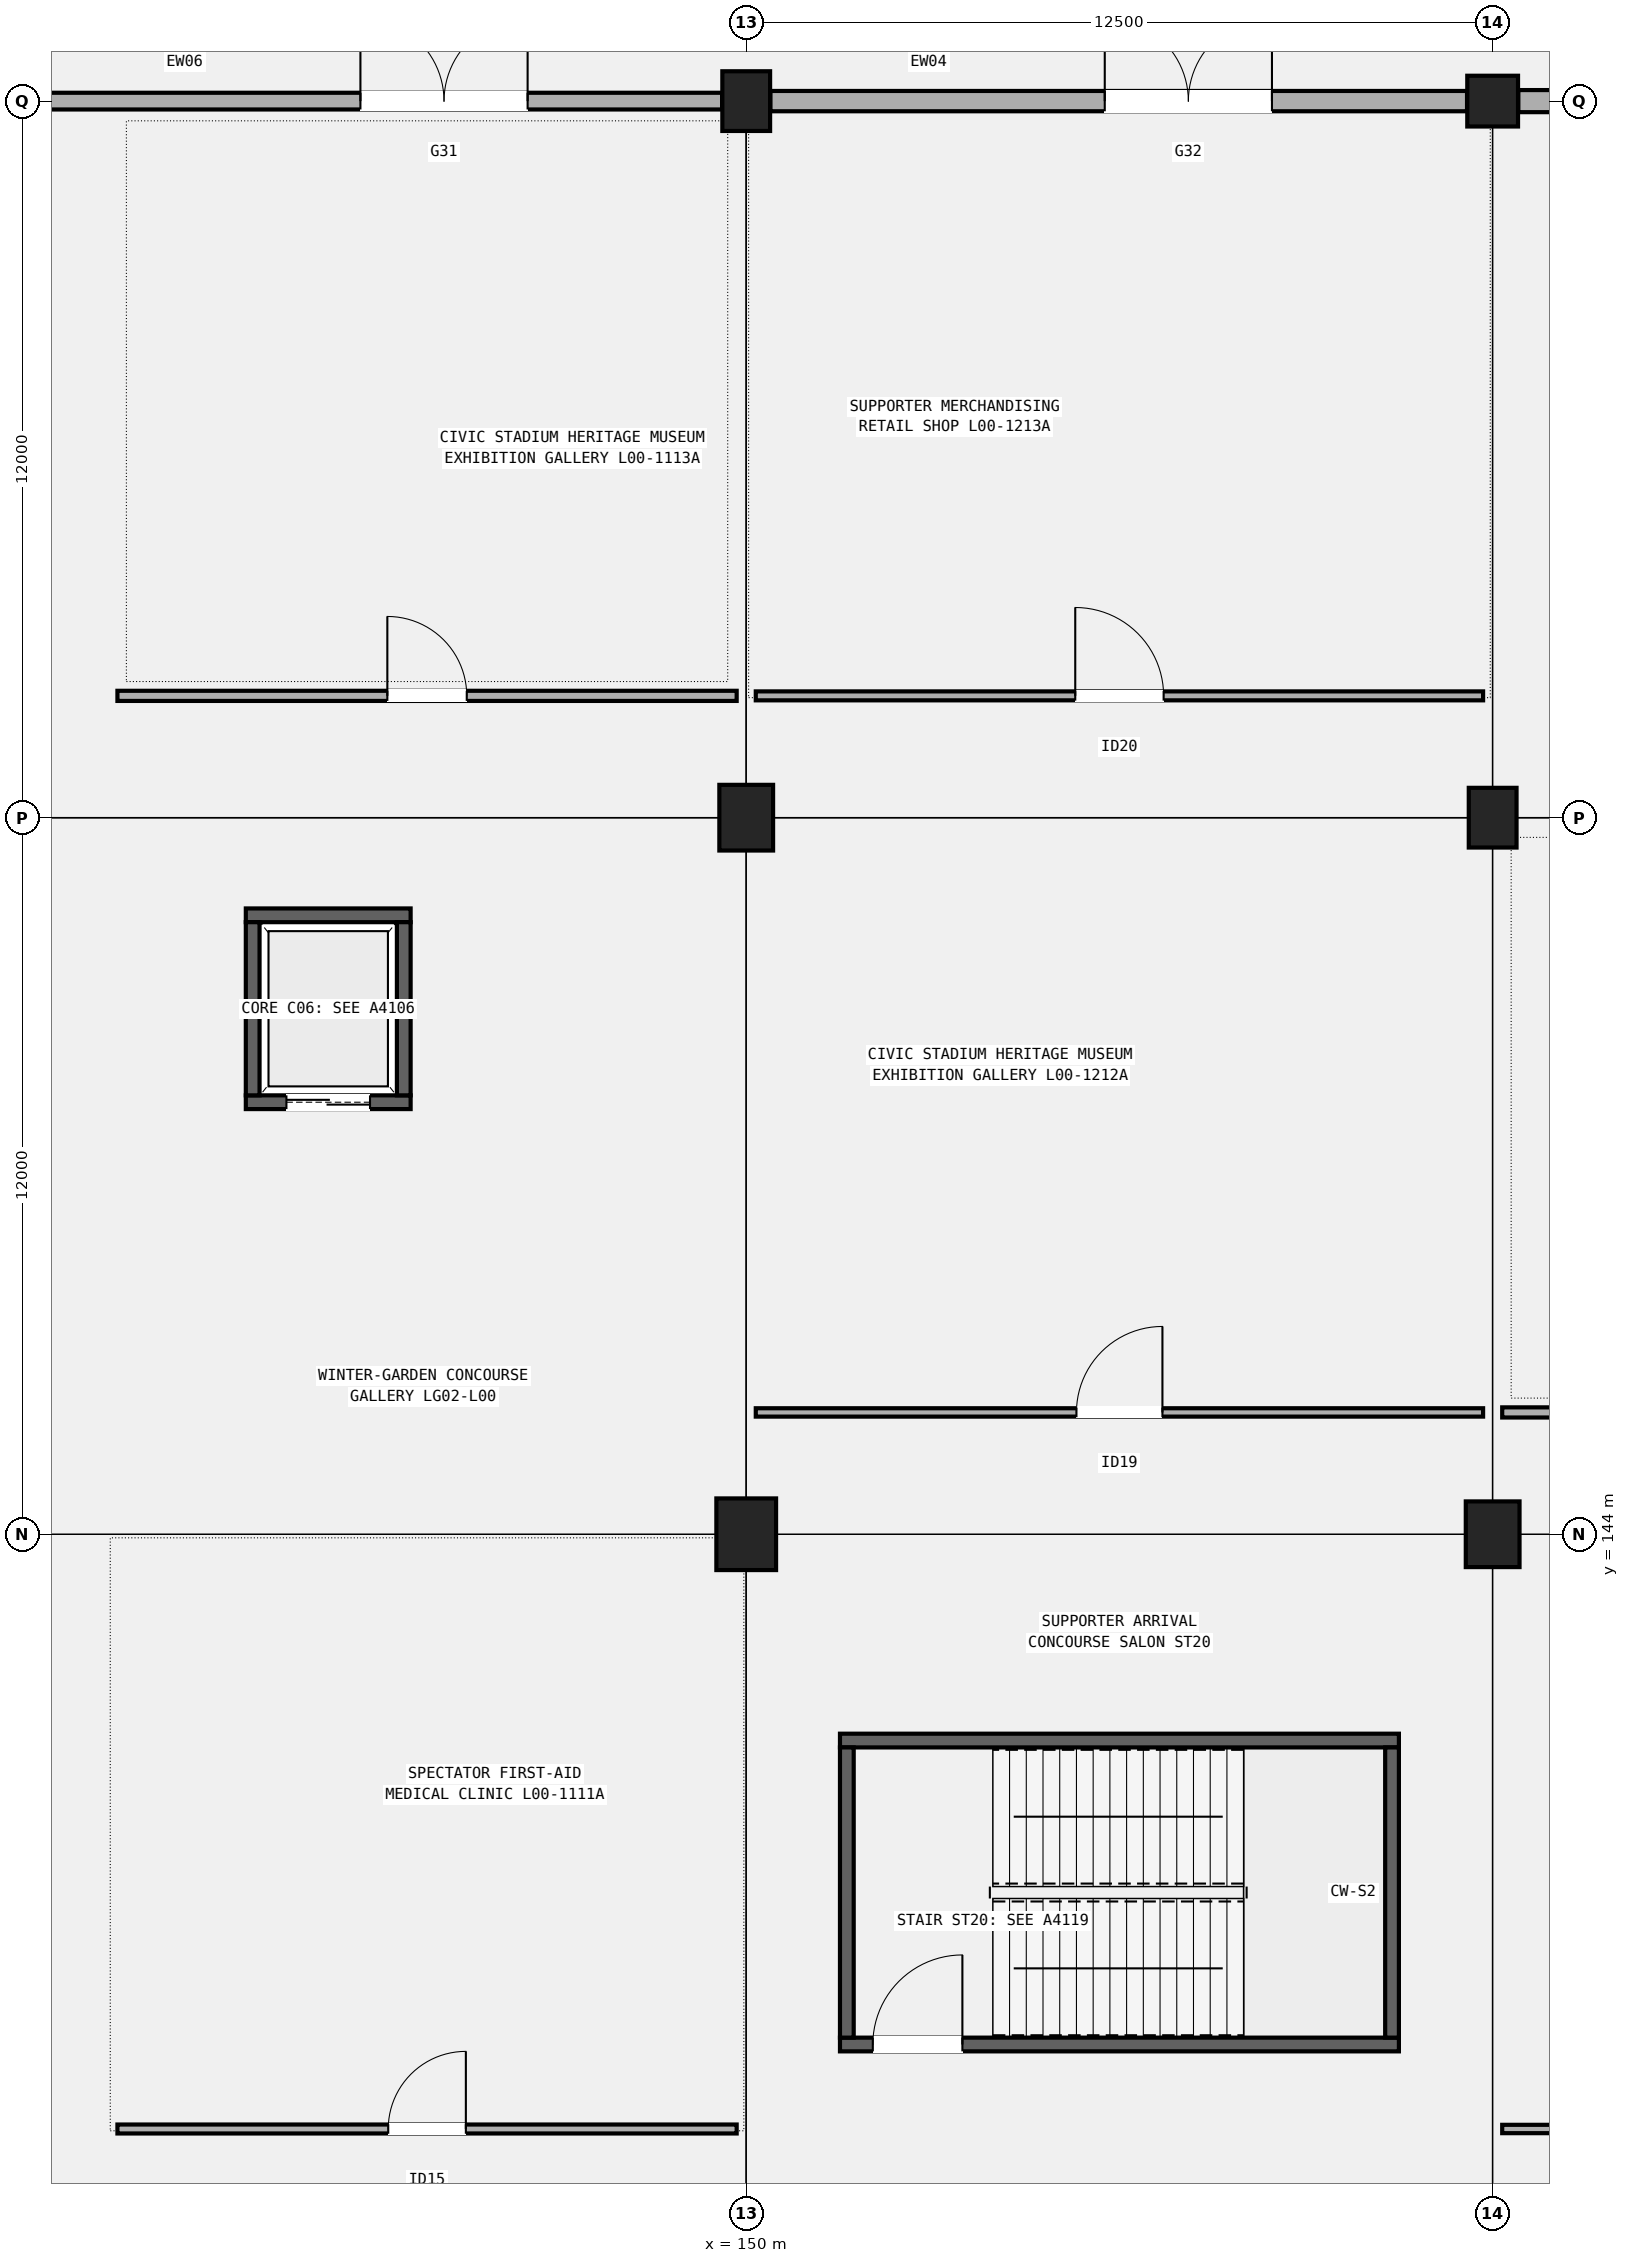
"""IFC4 building model, lengths in metres.
Left out: names, types, materials, properties, quantities, classifications, styles, units other than length and angle.
Written with IfcOpenShell. Run it as: python <this file> out.ifc"""

import sys

from ifc_helpers import new_model, si_unit, direction, frame, frame_2d, origin, origin_2d, place, context, subcontext, project, spatial, rectangle, circle, extrude, element, fill, save


model = new_model("IFC4")
c1 = context("Model", 3, precision=1e-05, world=origin(), true_north=direction((0.0, 1.0)))
c2 = subcontext(c1, "Body", "Model", "MODEL_VIEW")
j1 = project(units=[si_unit("LENGTHUNIT", "METRE"), si_unit("PLANEANGLEUNIT", "RADIAN")], contexts=[c1])
p1 = place(None, origin())
s1 = spatial("IfcSite", under=j1, at=p1, CompositionType="ELEMENT")
p2 = place(p1, origin())
s2 = spatial("IfcBuilding", under=s1, at=p2, CompositionType="ELEMENT")
p3 = place(p2, origin())
s3 = spatial("IfcBuildingStorey", under=s2, at=p3, CompositionType="ELEMENT", Elevation=0.0)
p4 = place(p3, frame((150.0, 144.0, 0.0), z_axis=(0.0, 0.0, 1.0), x_axis=(1.0, 0.0, 0.0)))
e1 = element("IfcColumn", 1, at=p4, inside=s3, PredefinedType="COLUMN", context=c2, shape_type="SweptSolid", body=[
    extrude(rectangle(XDim=1.0, YDim=1.2, at=origin_2d()), origin(), (0.0, 0.0, 1.0), 5.4),
])
p5 = place(p3, frame((150.0, 156.0, 0.0), z_axis=(0.0, 0.0, 1.0), x_axis=(1.0, 0.0, 0.0)))
e2 = element("IfcColumn", 2, at=p5, inside=s3, PredefinedType="COLUMN", context=c2, shape_type="SweptSolid", body=[
    extrude(rectangle(XDim=0.9, YDim=1.1, at=origin_2d()), origin(), (0.0, 0.0, 1.0), 5.4),
])
p6 = place(p3, frame((150.0, 168.0, 0.0), z_axis=(0.0, 0.0, 1.0), x_axis=(1.0, 0.0, 0.0)))
e3 = element("IfcColumn", 3, at=p6, inside=s3, PredefinedType="COLUMN", context=c2, shape_type="SweptSolid", body=[
    extrude(rectangle(XDim=0.8, YDim=1.0, at=origin_2d()), origin(), (0.0, 0.0, 1.0), 5.4),
])
p7 = place(p3, frame((162.5, 144.0, 0.0), z_axis=(0.0, 0.0, 1.0), x_axis=(1.0, 0.0, 0.0)))
e4 = element("IfcColumn", 4, at=p7, inside=s3, PredefinedType="COLUMN", context=c2, shape_type="SweptSolid", body=[
    extrude(rectangle(XDim=0.9, YDim=1.1, at=origin_2d()), origin(), (0.0, 0.0, 1.0), 5.4),
])
p8 = place(p3, frame((162.5, 156.0, 0.0), z_axis=(0.0, 0.0, 1.0), x_axis=(1.0, 0.0, 0.0)))
e5 = element("IfcColumn", 5, at=p8, inside=s3, PredefinedType="COLUMN", context=c2, shape_type="SweptSolid", body=[
    extrude(rectangle(XDim=0.8, YDim=1.0, at=origin_2d()), origin(), (0.0, 0.0, 1.0), 5.4),
])
p9 = place(p3, frame((162.5, 168.0, 0.0), z_axis=(0.0, 0.0, 1.0), x_axis=(1.0, 0.0, 0.0)))
e6 = element("IfcColumn", 6, at=p9, inside=s3, PredefinedType="COLUMN", context=c2, shape_type="SweptSolid", body=[
    extrude(circle(Radius=0.425, at=origin_2d()), origin(), (0.0, 0.0, 1.0), 5.4),
])
p10 = place(p3, frame((137.954, 168.0, 0.0), z_axis=(0.0, 0.0, 1.0), x_axis=(1.0, 0.0, 0.0)))
e7 = element("IfcWall", 7, at=p10, inside=s3, PredefinedType="SOLIDWALL", context=c2, shape_type="SweptSolid", body=[
    extrude(rectangle(XDim=11.642, YDim=0.28, at=frame_2d((5.821, 0.0))), origin(), (0.0, 0.0, 1.0), 4.24),
])
p11 = place(p10, frame((5.585, 0.0, 0.0)))
e8 = element("IfcOpeningElement", 8, at=p11, cuts=e7, PredefinedType="OPENING", context=c2, shape_type="SweptSolid", body=[
    extrude(rectangle(XDim=2.8, YDim=2.4, at=frame_2d((1.4, 1.2))), frame((0.0, 0.15, 0.0), z_axis=(0.0, -1.0, 0.0), x_axis=(1.0, 0.0, 0.0)), (0.0, 0.0, 1.0), 0.3),
])
p12 = place(p3, frame((150.404, 168.0, 0.0), z_axis=(0.0, 0.0, 1.0), x_axis=(1.0, 0.0, 0.0)))
e9 = element("IfcWall", 9, at=p12, inside=s3, PredefinedType="SOLIDWALL", context=c2, shape_type="SweptSolid", body=[
    extrude(rectangle(XDim=11.667, YDim=0.34, at=frame_2d((5.833, 0.0))), origin(), (0.0, 0.0, 1.0), 4.24),
])
p13 = place(p12, frame((5.6, 0.0, 0.0)))
e10 = element("IfcOpeningElement", 10, at=p13, cuts=e9, PredefinedType="OPENING", context=c2, shape_type="SweptSolid", body=[
    extrude(rectangle(XDim=2.8, YDim=2.4, at=frame_2d((1.4, 1.2))), frame((0.0, 0.18, 0.0), z_axis=(0.0, -1.0, 0.0), x_axis=(1.0, 0.0, 0.0)), (0.0, 0.0, 1.0), 0.36),
])
p14 = place(p3, frame((162.929, 168.0, 0.0), z_axis=(0.0, 0.0, 1.0), x_axis=(1.0, 0.0, 0.0)))
e11 = element("IfcWall", 11, at=p14, inside=s3, PredefinedType="SOLIDWALL", context=c2, shape_type="SweptSolid", body=[
    extrude(rectangle(XDim=11.567, YDim=0.37, at=frame_2d((5.784, 0.0))), origin(), (0.0, 0.0, 1.0), 4.34),
])
p15 = place(p14, frame((1.5, 0.0, 0.95)))
e12 = element("IfcOpeningElement", 12, at=p15, cuts=e11, PredefinedType="OPENING", context=c2, shape_type="SweptSolid", body=[
    extrude(rectangle(XDim=2.4, YDim=2.05, at=frame_2d((1.2, 1.025))), frame((0.0, 0.195, 0.0), z_axis=(0.0, -1.0, 0.0), x_axis=(1.0, 0.0, 0.0)), (0.0, 0.0, 1.0), 0.39),
])
p16 = place(p3, frame((151.57, 135.455, 0.0), z_axis=(0.0, 0.0, 1.0), x_axis=(1.0, 0.0, 0.0)))
e13 = element("IfcWall", 13, at=p16, inside=s3, PredefinedType="SHEAR", context=c2, shape_type="SweptSolid", body=[
    extrude(rectangle(XDim=9.36, YDim=0.23, at=frame_2d((4.68, 0.0))), origin(), (0.0, 0.0, 1.0), 5.14),
])
p17 = place(p16, frame((0.55, 0.0, 0.0)))
e14 = element("IfcOpeningElement", 14, at=p17, cuts=e13, PredefinedType="OPENING", context=c2, shape_type="SweptSolid", body=[
    extrude(rectangle(XDim=1.5, YDim=2.2, at=frame_2d((0.75, 1.1))), frame((0.0, 0.125, 0.0), z_axis=(0.0, -1.0, 0.0), x_axis=(1.0, 0.0, 0.0)), (0.0, 0.0, 1.0), 0.25),
])
p18 = place(p3, frame((151.57, 140.545, 0.0), z_axis=(0.0, 0.0, 1.0), x_axis=(1.0, 0.0, 0.0)))
e15 = element("IfcWall", 15, at=p18, inside=s3, PredefinedType="SHEAR", context=c2, shape_type="SweptSolid", body=[
    extrude(rectangle(XDim=9.36, YDim=0.23, at=frame_2d((4.68, 0.0))), origin(), (0.0, 0.0, 1.0), 5.14),
])
for number, where, z_axis, x_axis in (
    (16, (151.685, 135.57, 0.0), (0.0, 0.0, 1.0), (0.0, 1.0, 0.0)),
    (17, (160.815, 135.57, 0.0), (0.0, 0.0, 1.0), (0.0, 1.0, 0.0)),
):
    element("IfcWall", number, at=place(p3, frame(where, z_axis=z_axis, x_axis=x_axis)), inside=s3, PredefinedType="SHEAR", context=c2, shape_type="SweptSolid", body=[
        extrude(rectangle(XDim=4.86, YDim=0.23, at=frame_2d((2.43, 0.0))), origin(), (0.0, 0.0, 1.0), 5.14),
    ])
p19 = place(p3, frame((141.62, 151.235, 0.0), z_axis=(0.0, 0.0, 1.0), x_axis=(1.0, 0.0, 0.0)))
e18 = element("IfcWall", 18, at=p19, inside=s3, PredefinedType="SHEAR", context=c2, shape_type="SweptSolid", body=[
    extrude(rectangle(XDim=2.76, YDim=0.23, at=frame_2d((1.38, 0.0))), origin(), (0.0, 0.0, 1.0), 5.14),
])
p20 = place(p19, frame((0.68, 0.0, 0.0)))
e19 = element("IfcOpeningElement", 19, at=p20, cuts=e18, PredefinedType="OPENING", context=c2, shape_type="SweptSolid", body=[
    extrude(rectangle(XDim=1.4, YDim=2.25, at=frame_2d((0.7, 1.125))), frame((0.0, 0.125, 0.0), z_axis=(0.0, -1.0, 0.0), x_axis=(1.0, 0.0, 0.0)), (0.0, 0.0, 1.0), 0.25),
])
p21 = place(p3, frame((141.62, 154.365, 0.0), z_axis=(0.0, 0.0, 1.0), x_axis=(1.0, 0.0, 0.0)))
e20 = element("IfcWall", 20, at=p21, inside=s3, PredefinedType="SHEAR", context=c2, shape_type="SweptSolid", body=[
    extrude(rectangle(XDim=2.76, YDim=0.23, at=frame_2d((1.38, 0.0))), origin(), (0.0, 0.0, 1.0), 5.14),
])
for number, where, z_axis, x_axis in (
    (21, (141.735, 151.35, 0.0), (0.0, 0.0, 1.0), (0.0, 1.0, 0.0)),
    (22, (144.265, 151.35, 0.0), (0.0, 0.0, 1.0), (0.0, 1.0, 0.0)),
):
    element("IfcWall", number, at=place(p3, frame(where, z_axis=z_axis, x_axis=x_axis)), inside=s3, PredefinedType="SHEAR", context=c2, shape_type="SweptSolid", body=[
        extrude(rectangle(XDim=2.9, YDim=0.23, at=frame_2d((1.45, 0.0))), origin(), (0.0, 0.0, 1.0), 5.14),
    ])
p22 = place(p3, frame((139.47, 134.04, 0.0), z_axis=(0.0, 0.0, 1.0), x_axis=(1.0, 0.0, 0.0)))
e23 = element("IfcWall", 23, at=p22, inside=s3, PredefinedType="PARTITIONING", context=c2, shape_type="SweptSolid", body=[
    extrude(rectangle(XDim=10.37, YDim=0.15, at=frame_2d((5.185, 0.0))), origin(), (0.0, 0.0, 1.0), 4.52),
])
p23 = place(p22, frame((4.535, 0.0, 0.0)))
e24 = element("IfcOpeningElement", 24, at=p23, cuts=e23, PredefinedType="OPENING", context=c2, shape_type="SweptSolid", body=[
    extrude(rectangle(XDim=1.3, YDim=2.24, at=frame_2d((0.65, 1.12))), frame((0.0, 0.085, 0.0), z_axis=(0.0, -1.0, 0.0), x_axis=(1.0, 0.0, 0.0)), (0.0, 0.0, 1.0), 0.17),
])
p24 = place(p3, frame((139.47, 158.04, 0.0), z_axis=(0.0, 0.0, 1.0), x_axis=(1.0, 0.0, 0.0)))
e25 = element("IfcWall", 25, at=p24, inside=s3, PredefinedType="PARTITIONING", context=c2, shape_type="SweptSolid", body=[
    extrude(rectangle(XDim=10.37, YDim=0.17, at=frame_2d((5.185, 0.0))), origin(), (0.0, 0.0, 1.0), 4.52),
])
p25 = place(p24, frame((4.52, 0.0, 0.0)))
e26 = element("IfcOpeningElement", 26, at=p25, cuts=e25, PredefinedType="OPENING", context=c2, shape_type="SweptSolid", body=[
    extrude(rectangle(XDim=1.33, YDim=2.22, at=frame_2d((0.665, 1.11))), frame((0.0, 0.095, 0.0), z_axis=(0.0, -1.0, 0.0), x_axis=(1.0, 0.0, 0.0)), (0.0, 0.0, 1.0), 0.19),
])
p26 = place(p3, frame((150.16, 146.04, 0.0), z_axis=(0.0, 0.0, 1.0), x_axis=(1.0, 0.0, 0.0)))
e27 = element("IfcWall", 27, at=p26, inside=s3, PredefinedType="PARTITIONING", context=c2, shape_type="SweptSolid", body=[
    extrude(rectangle(XDim=12.18, YDim=0.14, at=frame_2d((6.09, 0.0))), origin(), (0.0, 0.0, 1.0), 4.52),
])
p27 = place(p26, frame((5.37, 0.0, 0.0)))
e28 = element("IfcOpeningElement", 28, at=p27, cuts=e27, PredefinedType="OPENING", context=c2, shape_type="SweptSolid", body=[
    extrude(rectangle(XDim=1.44, YDim=2.26, at=frame_2d((0.72, 1.13))), frame((0.0, 0.08, 0.0), z_axis=(0.0, -1.0, 0.0), x_axis=(1.0, 0.0, 0.0)), (0.0, 0.0, 1.0), 0.16),
])
p28 = place(p3, frame((150.16, 158.04, 0.0), z_axis=(0.0, 0.0, 1.0), x_axis=(1.0, 0.0, 0.0)))
e29 = element("IfcWall", 29, at=p28, inside=s3, PredefinedType="PARTITIONING", context=c2, shape_type="SweptSolid", body=[
    extrude(rectangle(XDim=12.18, YDim=0.15, at=frame_2d((6.09, 0.0))), origin(), (0.0, 0.0, 1.0), 4.52),
])
p29 = place(p28, frame((5.35, 0.0, 0.0)))
e30 = element("IfcOpeningElement", 30, at=p29, cuts=e29, PredefinedType="OPENING", context=c2, shape_type="SweptSolid", body=[
    extrude(rectangle(XDim=1.48, YDim=2.24, at=frame_2d((0.74, 1.12))), frame((0.0, 0.085, 0.0), z_axis=(0.0, -1.0, 0.0), x_axis=(1.0, 0.0, 0.0)), (0.0, 0.0, 1.0), 0.17),
])
p30 = place(p3, frame((162.66, 134.04, 0.0), z_axis=(0.0, 0.0, 1.0), x_axis=(1.0, 0.0, 0.0)))
e31 = element("IfcWall", 31, at=p30, inside=s3, PredefinedType="PARTITIONING", context=c2, shape_type="SweptSolid", body=[
    extrude(rectangle(XDim=12.18, YDim=0.14, at=frame_2d((6.09, 0.0))), origin(), (0.0, 0.0, 1.0), 4.52),
])
p31 = place(p30, frame((2.064, 0.0, 0.0)))
e32 = element("IfcOpeningElement", 32, at=p31, cuts=e31, PredefinedType="OPENING", context=c2, shape_type="SweptSolid", body=[
    extrude(rectangle(XDim=1.7, YDim=2.32, at=frame_2d((0.85, 1.16))), frame((0.0, 0.08, 0.0), z_axis=(0.0, -1.0, 0.0), x_axis=(1.0, 0.0, 0.0)), (0.0, 0.0, 1.0), 0.16),
])
p32 = place(p30, frame((8.204, 0.0, 0.0)))
e33 = element("IfcOpeningElement", 33, at=p32, cuts=e31, PredefinedType="OPENING", context=c2, shape_type="SweptSolid", body=[
    extrude(rectangle(XDim=1.76, YDim=2.3, at=frame_2d((0.88, 1.15))), frame((0.0, 0.08, 0.0), z_axis=(0.0, -1.0, 0.0), x_axis=(1.0, 0.0, 0.0)), (0.0, 0.0, 1.0), 0.16),
])
p33 = place(p3, frame((162.66, 146.04, 0.0), z_axis=(0.0, 0.0, 1.0), x_axis=(1.0, 0.0, 0.0)))
e34 = element("IfcWall", 34, at=p33, inside=s3, PredefinedType="PARTITIONING", context=c2, shape_type="SweptSolid", body=[
    extrude(rectangle(XDim=12.18, YDim=0.17, at=frame_2d((6.09, 0.0))), origin(), (0.0, 0.0, 1.0), 4.52),
])
p34 = place(p33, frame((5.64, 0.0, 0.0)))
e35 = element("IfcOpeningElement", 35, at=p34, cuts=e34, PredefinedType="OPENING", context=c2, shape_type="SweptSolid", body=[
    extrude(rectangle(XDim=0.9, YDim=2.06, at=frame_2d((0.45, 1.03))), frame((0.0, 0.095, 0.0), z_axis=(0.0, -1.0, 0.0), x_axis=(1.0, 0.0, 0.0)), (0.0, 0.0, 1.0), 0.19),
])
p35 = place(p11, origin())
e36 = element("IfcDoor", 36, at=p35, inside=s3, OperationType="DOUBLE_DOOR_SINGLE_SWING", PredefinedType="DOOR", context=c2, shape_type="SweptSolid", body=[
    extrude(rectangle(XDim=2.8, YDim=2.4, at=frame_2d((1.4, 1.2))), frame((0.0, 0.025, 0.0), z_axis=(0.0, -1.0, 0.0), x_axis=(1.0, 0.0, 0.0)), (0.0, 0.0, 1.0), 0.05),
])
fill(e8, e36)
p36 = place(p13, origin())
e37 = element("IfcDoor", 37, at=p36, inside=s3, OperationType="DOUBLE_DOOR_SINGLE_SWING", PredefinedType="DOOR", context=c2, shape_type="SweptSolid", body=[
    extrude(rectangle(XDim=2.8, YDim=2.4, at=frame_2d((1.4, 1.2))), frame((0.0, 0.025, 0.0), z_axis=(0.0, -1.0, 0.0), x_axis=(1.0, 0.0, 0.0)), (0.0, 0.0, 1.0), 0.05),
])
fill(e10, e37)
p37 = place(p17, origin())
e38 = element("IfcDoor", 38, at=p37, inside=s3, OperationType="SINGLE_SWING_RIGHT", PredefinedType="DOOR", context=c2, shape_type="SweptSolid", body=[
    extrude(rectangle(XDim=1.5, YDim=2.2, at=frame_2d((0.75, 1.1))), frame((0.0, 0.025, 0.0), z_axis=(0.0, -1.0, 0.0), x_axis=(1.0, 0.0, 0.0)), (0.0, 0.0, 1.0), 0.05),
])
fill(e14, e38)
p38 = place(p20, origin())
e39 = element("IfcDoor", 39, at=p38, inside=s3, OperationType="DOUBLE_DOOR_SLIDING", PredefinedType="DOOR", context=c2, shape_type="SweptSolid", body=[
    extrude(rectangle(XDim=1.4, YDim=2.25, at=frame_2d((0.7, 1.125))), frame((0.0, 0.025, 0.0), z_axis=(0.0, -1.0, 0.0), x_axis=(1.0, 0.0, 0.0)), (0.0, 0.0, 1.0), 0.05),
])
fill(e19, e39)
p39 = place(p23, origin())
e40 = element("IfcDoor", 40, at=p39, inside=s3, OperationType="SINGLE_SWING_RIGHT", PredefinedType="DOOR", context=c2, shape_type="SweptSolid", body=[
    extrude(rectangle(XDim=1.3, YDim=2.24, at=frame_2d((0.65, 1.12))), frame((0.0, 0.025, 0.0), z_axis=(0.0, -1.0, 0.0), x_axis=(1.0, 0.0, 0.0)), (0.0, 0.0, 1.0), 0.05),
])
fill(e24, e40)
p40 = place(p25, origin())
e41 = element("IfcDoor", 41, at=p40, inside=s3, OperationType="SINGLE_SWING_LEFT", PredefinedType="DOOR", context=c2, shape_type="SweptSolid", body=[
    extrude(rectangle(XDim=1.33, YDim=2.22, at=frame_2d((0.665, 1.11))), frame((0.0, 0.025, 0.0), z_axis=(0.0, -1.0, 0.0), x_axis=(1.0, 0.0, 0.0)), (0.0, 0.0, 1.0), 0.05),
])
fill(e26, e41)
p41 = place(p27, origin())
e42 = element("IfcDoor", 42, at=p41, inside=s3, OperationType="SINGLE_SWING_RIGHT", PredefinedType="DOOR", context=c2, shape_type="SweptSolid", body=[
    extrude(rectangle(XDim=1.44, YDim=2.26, at=frame_2d((0.72, 1.13))), frame((0.0, 0.025, 0.0), z_axis=(0.0, -1.0, 0.0), x_axis=(1.0, 0.0, 0.0)), (0.0, 0.0, 1.0), 0.05),
])
fill(e28, e42)
p42 = place(p29, origin())
e43 = element("IfcDoor", 43, at=p42, inside=s3, OperationType="SINGLE_SWING_LEFT", PredefinedType="DOOR", context=c2, shape_type="SweptSolid", body=[
    extrude(rectangle(XDim=1.48, YDim=2.24, at=frame_2d((0.74, 1.12))), frame((0.0, 0.025, 0.0), z_axis=(0.0, -1.0, 0.0), x_axis=(1.0, 0.0, 0.0)), (0.0, 0.0, 1.0), 0.05),
])
fill(e30, e43)
save(model, sys.argv[1])
